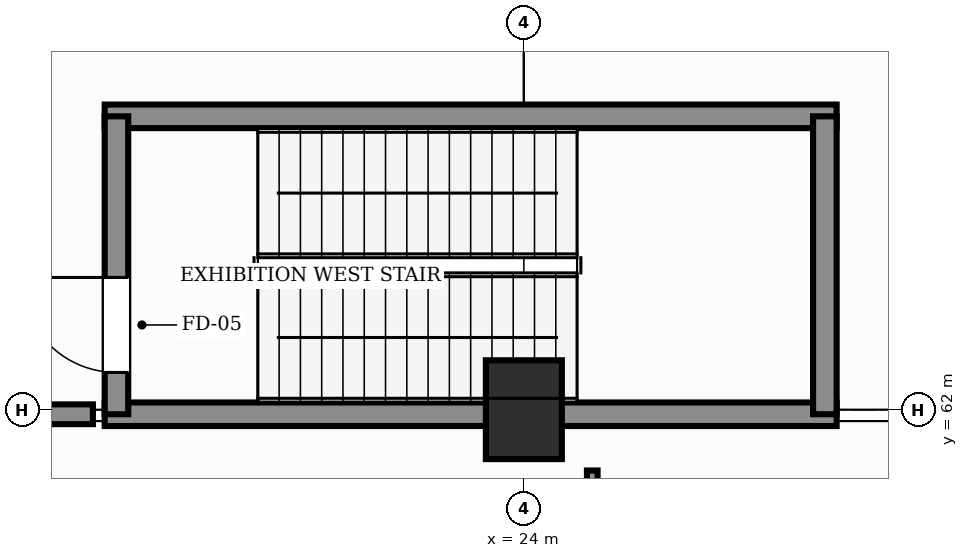
"""IFC4 building model, lengths in metres.
Left out: names, types, materials, properties, quantities, classifications, styles, units other than length and angle.
Written with IfcOpenShell. Run it as: python <this file> out.ifc"""

import sys

from ifc_helpers import new_model, si_unit, direction, frame, frame_2d, origin, origin_2d, place, context, subcontext, project, spatial, rectangle, extrude, element, fill, save


model = new_model("IFC4")
c1 = context("Model", 3, precision=1e-05, world=origin(), true_north=direction((0.0, 1.0)))
c2 = subcontext(c1, "Body", "Model", "MODEL_VIEW")
j1 = project(units=[si_unit("LENGTHUNIT", "METRE"), si_unit("PLANEANGLEUNIT", "RADIAN")], contexts=[c1])
p1 = place(None, origin())
s1 = spatial("IfcSite", under=j1, at=p1, CompositionType="ELEMENT")
p2 = place(p1, origin())
s2 = spatial("IfcBuilding", under=s1, at=p2, CompositionType="ELEMENT")
p3 = place(p2, origin())
s3 = spatial("IfcBuildingStorey", under=s2, at=p3, CompositionType="ELEMENT", Elevation=0.0)
p4 = place(p3, frame((24.0, 62.0, 0.0), z_axis=(0.0, 0.0, 1.0), x_axis=(1.0, 0.0, 0.0)))
e1 = element("IfcColumn", 1, at=p4, inside=s3, PredefinedType="COLUMN", context=c2, shape_type="SweptSolid", body=[
    extrude(rectangle(XDim=1.0, YDim=1.3, at=origin_2d()), origin(), (0.0, 0.0, 1.0), 6.0),
])
for number, where, z_axis, x_axis in (
    (2, (18.485, 61.94, 0.0), (0.0, 0.0, 1.0), (1.0, 0.0, 0.0)),
    (3, (18.485, 65.86, 0.0), (0.0, 0.0, 1.0), (1.0, 0.0, 0.0)),
):
    element("IfcWall", number, at=place(p3, frame(where, z_axis=z_axis, x_axis=x_axis)), inside=s3, PredefinedType="SHEAR", context=c2, shape_type="SweptSolid", body=[
        extrude(rectangle(XDim=9.63, YDim=0.31, at=frame_2d((4.815, 0.0))), origin(), (0.0, 0.0, 1.0), 6.0),
    ])
p5 = place(p3, frame((18.64, 61.94, 0.0), z_axis=(0.0, 0.0, 1.0), x_axis=(0.0, 1.0, 0.0)))
e4 = element("IfcWall", 4, at=p5, inside=s3, PredefinedType="SHEAR", context=c2, shape_type="SweptSolid", body=[
    extrude(rectangle(XDim=3.92, YDim=0.31, at=frame_2d((1.96, 0.0))), origin(), (0.0, 0.0, 1.0), 6.0),
])
p6 = place(p5, frame((0.55, 0.0, 0.0)))
e5 = element("IfcOpeningElement", 5, at=p6, cuts=e4, PredefinedType="OPENING", context=c2, shape_type="SweptSolid", body=[
    extrude(rectangle(XDim=1.25, YDim=2.2, at=frame_2d((0.625, 1.1))), frame((0.0, 0.165, 0.0), z_axis=(0.0, -1.0, 0.0), x_axis=(1.0, 0.0, 0.0)), (0.0, 0.0, 1.0), 0.33),
])
p7 = place(p3, frame((27.96, 61.94, 0.0), z_axis=(0.0, 0.0, 1.0), x_axis=(0.0, 1.0, 0.0)))
e6 = element("IfcWall", 6, at=p7, inside=s3, PredefinedType="SHEAR", context=c2, shape_type="SweptSolid", body=[
    extrude(rectangle(XDim=3.92, YDim=0.31, at=frame_2d((1.96, 0.0))), origin(), (0.0, 0.0, 1.0), 6.0),
])
p8 = place(p3, frame((8.5, 61.94, 0.0), z_axis=(0.0, 0.0, 1.0), x_axis=(1.0, 0.0, 0.0)))
e7 = element("IfcWall", 7, at=p8, inside=s3, PredefinedType="SOLIDWALL", context=c2, shape_type="SweptSolid", body=[
    extrude(rectangle(XDim=9.83, YDim=0.26, at=frame_2d((4.915, 0.0))), origin(), (0.0, 0.0, 1.0), 6.0),
])
p9 = place(p8, frame((3.4, 0.0, 0.0)))
e8 = element("IfcOpeningElement", 8, at=p9, cuts=e7, PredefinedType="OPENING", context=c2, shape_type="SweptSolid", body=[
    extrude(rectangle(XDim=2.35, YDim=2.55, at=frame_2d((1.175, 1.275))), frame((0.0, 0.14, 0.0), z_axis=(0.0, -1.0, 0.0), x_axis=(1.0, 0.0, 0.0)), (0.0, 0.0, 1.0), 0.28),
])
p10 = place(p3, frame((24.9, 36.2, 0.0), z_axis=(0.0, 0.0, 1.0), x_axis=(0.0, 1.0, 0.0)))
e9 = element("IfcWall", 9, at=p10, inside=s3, PredefinedType="PARTITIONING", context=c2, shape_type="SweptSolid", body=[
    extrude(rectangle(XDim=25.0, YDim=0.14, at=frame_2d((12.5, 0.0))), origin(), (0.0, 0.0, 1.0), 4.65),
])
p11 = place(p10, frame((6.5, 0.0, 0.0)))
e10 = element("IfcOpeningElement", 10, at=p11, cuts=e9, PredefinedType="OPENING", context=c2, shape_type="SweptSolid", body=[
    extrude(rectangle(XDim=1.7, YDim=2.25, at=frame_2d((0.85, 1.125))), frame((0.0, 0.08, 0.0), z_axis=(0.0, -1.0, 0.0), x_axis=(1.0, 0.0, 0.0)), (0.0, 0.0, 1.0), 0.16),
])
p12 = place(p6, origin())
e11 = element("IfcDoor", 11, at=p12, inside=s3, OperationType="SINGLE_SWING_RIGHT", PredefinedType="DOOR", context=c2, shape_type="SweptSolid", body=[
    extrude(rectangle(XDim=1.25, YDim=2.2, at=frame_2d((0.625, 1.1))), frame((0.0, 0.025, 0.0), z_axis=(0.0, -1.0, 0.0), x_axis=(1.0, 0.0, 0.0)), (0.0, 0.0, 1.0), 0.05),
])
fill(e5, e11)
save(model, sys.argv[1])
